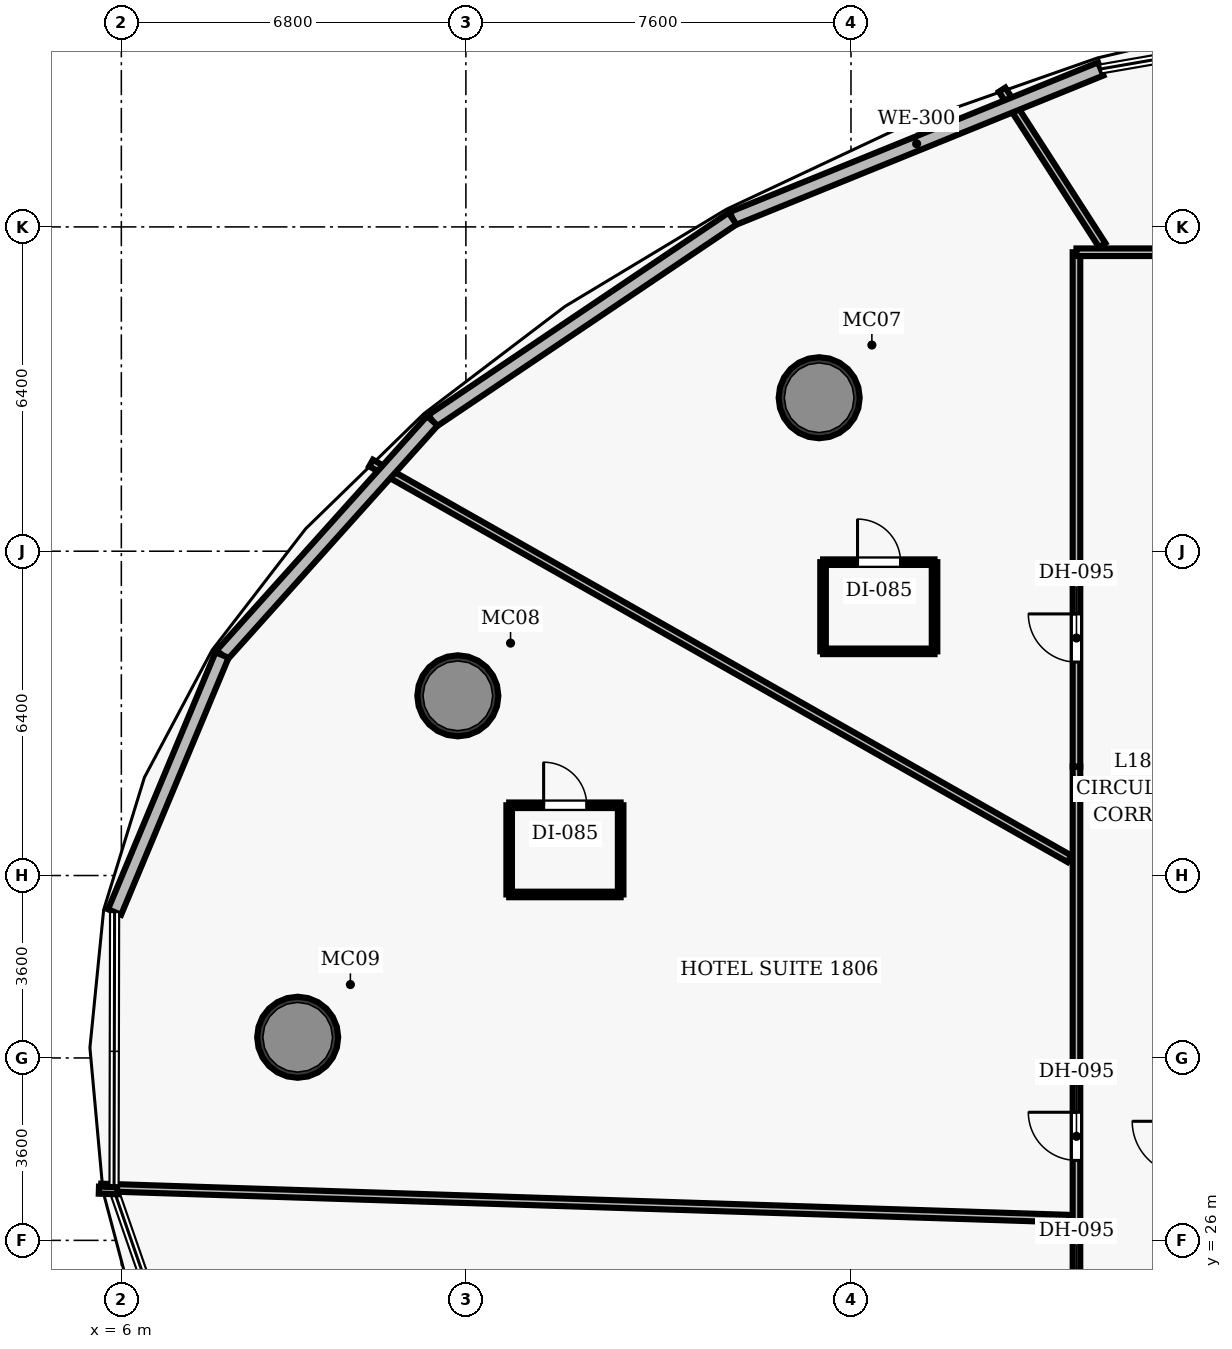
"""IFC4 building model, lengths in metres.
Left out: names, types, materials, properties, quantities, classifications, styles, units other than length and angle.
Written with IfcOpenShell. Run it as: python <this file> out.ifc"""

import sys

from ifc_helpers import new_model, si_unit, direction, frame, frame_2d, origin, origin_2d, place, context, subcontext, project, spatial, rectangle, hollow_circle, extrude, element, fill, save


model = new_model("IFC4")
c1 = context("Model", 3, precision=1e-05, world=origin(), true_north=direction((0.0, 1.0)))
c2 = subcontext(c1, "Body", "Model", "MODEL_VIEW")
j1 = project(units=[si_unit("LENGTHUNIT", "METRE"), si_unit("PLANEANGLEUNIT", "RADIAN")], contexts=[c1])
p1 = place(None, origin())
s1 = spatial("IfcSite", under=j1, at=p1, CompositionType="ELEMENT")
p2 = place(p1, origin())
s2 = spatial("IfcBuilding", under=s1, at=p2, CompositionType="ELEMENT")
p3 = place(p2, frame((0.0, 0.0, 79.9)))
s3 = spatial("IfcBuildingStorey", under=s2, at=p3, CompositionType="ELEMENT", Elevation=79.9)
for number, where, z_axis, x_axis in (
    (1, (19.772, 42.629, 0.0), (0.0, 0.0, 1.0), (1.0, 0.0, 0.0)),
    (2, (12.641, 36.746, 0.0), (0.0, 0.0, 1.0), (1.0, 0.0, 0.0)),
    (3, (9.48, 30.008, 0.0), (0.0, 0.0, 1.0), (1.0, 0.0, 0.0)),
):
    element("IfcColumn", number, at=place(p3, frame(where, z_axis=z_axis, x_axis=x_axis)), inside=s3, PredefinedType="COLUMN", context=c2, shape_type="SweptSolid", body=[
        extrude(hollow_circle(Radius=0.8, WallThickness=0.06, at=origin_2d()), origin(), (0.0, 0.0, 1.0), 3.5),
    ])
p4 = place(p3, frame((24.85, 19.45, 0.0), z_axis=(0.0, 0.0, 1.0), x_axis=(0.0, 1.0, 0.0)))
e4 = element("IfcWall", 4, at=p4, inside=s3, PredefinedType="PARTITIONING", context=c2, shape_type="SweptSolid", body=[
    extrude(rectangle(XDim=15.9, YDim=0.15, at=frame_2d((7.95, 0.0))), origin(), (0.0, 0.0, 1.0), 2.6),
])
p5 = place(p4, frame((8.128, 0.0, 0.0)))
e5 = element("IfcOpeningElement", 5, at=p5, cuts=e4, PredefinedType="OPENING", context=c2, shape_type="SweptSolid", body=[
    extrude(rectangle(XDim=0.95, YDim=2.15, at=frame_2d((0.475, 1.075))), frame((0.0, 0.085, 0.0), z_axis=(0.0, -1.0, 0.0), x_axis=(1.0, 0.0, 0.0)), (0.0, 0.0, 1.0), 0.17),
])
p6 = place(p4, frame((4.98, 0.0, 0.0)))
e6 = element("IfcOpeningElement", 6, at=p6, cuts=e4, PredefinedType="OPENING", context=c2, shape_type="SweptSolid", body=[
    extrude(rectangle(XDim=0.95, YDim=2.15, at=frame_2d((0.475, 1.075))), frame((0.0, 0.085, 0.0), z_axis=(0.0, -1.0, 0.0), x_axis=(1.0, 0.0, 0.0)), (0.0, 0.0, 1.0), 0.17),
])
p7 = place(p3, frame((24.85, 35.35, 0.0), z_axis=(0.0, 0.0, 1.0), x_axis=(0.0, 1.0, 0.0)))
e7 = element("IfcWall", 7, at=p7, inside=s3, PredefinedType="PARTITIONING", context=c2, shape_type="SweptSolid", body=[
    extrude(rectangle(XDim=10.15, YDim=0.15, at=frame_2d((5.075, 0.0))), origin(), (0.0, 0.0, 1.0), 2.6),
])
p8 = place(p7, frame((2.062, 0.0, 0.0)))
e8 = element("IfcOpeningElement", 8, at=p8, cuts=e7, PredefinedType="OPENING", context=c2, shape_type="SweptSolid", body=[
    extrude(rectangle(XDim=0.95, YDim=2.15, at=frame_2d((0.475, 1.075))), frame((0.0, 0.085, 0.0), z_axis=(0.0, -1.0, 0.0), x_axis=(1.0, 0.0, 0.0)), (0.0, 0.0, 1.0), 0.17),
])
p9 = place(p3, frame((24.85, 45.5, 0.0), z_axis=(0.0, 0.0, 1.0), x_axis=(1.0, 0.0, 0.0)))
e9 = element("IfcWall", 9, at=p9, inside=s3, PredefinedType="PARTITIONING", context=c2, shape_type="SweptSolid", body=[
    extrude(rectangle(XDim=2.8, YDim=0.15, at=frame_2d((1.4, 0.0))), origin(), (0.0, 0.0, 1.0), 2.6),
])
p10 = place(p3, frame((25.358, 45.64, 0.0), z_axis=(0.0, 0.0, 1.0), x_axis=(-0.541288402423, 0.840837002874, 0.0)))
e10 = element("IfcWall", 10, at=p10, inside=s3, PredefinedType="PARTITIONING", context=c2, shape_type="SweptSolid", body=[
    extrude(rectangle(XDim=3.649, YDim=0.15, at=frame_2d((1.824, 0.0))), origin(), (0.0, 0.0, 1.0), 2.6),
])
p11 = place(p3, frame((24.71, 33.531, 0.0), z_axis=(0.0, 0.0, 1.0), x_axis=(-0.87002725421, 0.493003627707, 0.0)))
e11 = element("IfcWall", 11, at=p11, inside=s3, PredefinedType="PARTITIONING", context=c2, shape_type="SweptSolid", body=[
    extrude(rectangle(XDim=15.84, YDim=0.15, at=frame_2d((7.92, 0.0))), origin(), (0.0, 0.0, 1.0), 2.6),
])
p12 = place(p3, frame((24.71, 26.428, 0.0), z_axis=(0.0, 0.0, 1.0), x_axis=(-0.99948130829, 0.032204260266, 0.0)))
e12 = element("IfcWall", 12, at=p12, inside=s3, PredefinedType="PARTITIONING", context=c2, shape_type="SweptSolid", body=[
    extrude(rectangle(XDim=19.119, YDim=0.15, at=frame_2d((9.56, 0.0))), origin(), (0.0, 0.0, 1.0), 2.6),
])
p13 = place(p3, frame((19.849, 37.624, 0.0), z_axis=(0.0, 0.0, 1.0), x_axis=(1.0, 0.0, 0.0)))
e13 = element("IfcWall", 13, at=p13, inside=s3, PredefinedType="PARTITIONING", context=c2, shape_type="SweptSolid", body=[
    extrude(rectangle(XDim=2.2, YDim=0.11, at=frame_2d((1.1, 0.0))), origin(), (0.0, 0.0, 1.0), 2.6),
])
p14 = place(p3, frame((19.849, 39.384, 0.0), z_axis=(0.0, 0.0, 1.0), x_axis=(1.0, 0.0, 0.0)))
e14 = element("IfcWall", 14, at=p14, inside=s3, PredefinedType="PARTITIONING", context=c2, shape_type="SweptSolid", body=[
    extrude(rectangle(XDim=2.2, YDim=0.11, at=frame_2d((1.1, 0.0))), origin(), (0.0, 0.0, 1.0), 2.6),
])
p15 = place(p14, frame((0.68, 0.0, 0.0)))
e15 = element("IfcOpeningElement", 15, at=p15, cuts=e14, PredefinedType="OPENING", context=c2, shape_type="SweptSolid", body=[
    extrude(rectangle(XDim=0.85, YDim=2.1, at=frame_2d((0.425, 1.05))), frame((0.0, 0.065, 0.0), z_axis=(0.0, -1.0, 0.0), x_axis=(1.0, 0.0, 0.0)), (0.0, 0.0, 1.0), 0.13),
])
for number, where, z_axis, x_axis in (
    (16, (19.849, 37.624, 0.0), (0.0, 0.0, 1.0), (0.0, 1.0, 0.0)),
    (17, (22.049, 37.624, 0.0), (0.0, 0.0, 1.0), (0.0, 1.0, 0.0)),
):
    element("IfcWall", number, at=place(p3, frame(where, z_axis=z_axis, x_axis=x_axis)), inside=s3, PredefinedType="PARTITIONING", context=c2, shape_type="SweptSolid", body=[
        extrude(rectangle(XDim=1.76, YDim=0.11, at=frame_2d((0.88, 0.0))), origin(), (0.0, 0.0, 1.0), 2.6),
    ])
p16 = place(p3, frame((13.654, 32.826, 0.0), z_axis=(0.0, 0.0, 1.0), x_axis=(1.0, 0.0, 0.0)))
e18 = element("IfcWall", 18, at=p16, inside=s3, PredefinedType="PARTITIONING", context=c2, shape_type="SweptSolid", body=[
    extrude(rectangle(XDim=2.2, YDim=0.11, at=frame_2d((1.1, 0.0))), origin(), (0.0, 0.0, 1.0), 2.6),
])
p17 = place(p3, frame((13.654, 34.586, 0.0), z_axis=(0.0, 0.0, 1.0), x_axis=(1.0, 0.0, 0.0)))
e19 = element("IfcWall", 19, at=p17, inside=s3, PredefinedType="PARTITIONING", context=c2, shape_type="SweptSolid", body=[
    extrude(rectangle(XDim=2.2, YDim=0.11, at=frame_2d((1.1, 0.0))), origin(), (0.0, 0.0, 1.0), 2.6),
])
p18 = place(p17, frame((0.68, 0.0, 0.0)))
e20 = element("IfcOpeningElement", 20, at=p18, cuts=e19, PredefinedType="OPENING", context=c2, shape_type="SweptSolid", body=[
    extrude(rectangle(XDim=0.85, YDim=2.1, at=frame_2d((0.425, 1.05))), frame((0.0, 0.065, 0.0), z_axis=(0.0, -1.0, 0.0), x_axis=(1.0, 0.0, 0.0)), (0.0, 0.0, 1.0), 0.13),
])
for number, where, z_axis, x_axis in (
    (21, (13.654, 32.826, 0.0), (0.0, 0.0, 1.0), (0.0, 1.0, 0.0)),
    (22, (15.854, 32.826, 0.0), (0.0, 0.0, 1.0), (0.0, 1.0, 0.0)),
):
    element("IfcWall", number, at=place(p3, frame(where, z_axis=z_axis, x_axis=x_axis)), inside=s3, PredefinedType="PARTITIONING", context=c2, shape_type="SweptSolid", body=[
        extrude(rectangle(XDim=1.76, YDim=0.11, at=frame_2d((0.88, 0.0))), origin(), (0.0, 0.0, 1.0), 2.6),
    ])
p19 = place(p3, frame((18.062, 46.164, 0.0), z_axis=(0.0, 0.0, 1.0), x_axis=(0.926415021548, 0.376503928067, 0.0)))
e23 = element("IfcWall", 23, at=p19, inside=s3, PredefinedType="SOLIDWALL", context=c2, shape_type="SweptSolid", body=[
    extrude(rectangle(XDim=7.845, YDim=0.28, at=frame_2d((3.922, 0.0))), origin(), (0.0, 0.0, 1.0), 3.25),
])
p20 = place(p3, frame((12.137, 42.173, 0.0), z_axis=(0.0, 0.0, 1.0), x_axis=(0.829395880277, 0.558661322967, 0.0)))
e24 = element("IfcWall", 24, at=p20, inside=s3, PredefinedType="SOLIDWALL", context=c2, shape_type="SweptSolid", body=[
    extrude(rectangle(XDim=7.143, YDim=0.28, at=frame_2d((3.571, 0.0))), origin(), (0.0, 0.0, 1.0), 3.25),
])
p21 = place(p3, frame((7.987, 37.551, 0.0), z_axis=(0.0, 0.0, 1.0), x_axis=(0.668121821361, 0.744051901295, 0.0)))
e25 = element("IfcWall", 25, at=p21, inside=s3, PredefinedType="SOLIDWALL", context=c2, shape_type="SweptSolid", body=[
    extrude(rectangle(XDim=6.212, YDim=0.28, at=frame_2d((3.106, 0.0))), origin(), (0.0, 0.0, 1.0), 3.25),
])
p22 = place(p3, frame((5.867, 32.479, 0.0), z_axis=(0.0, 0.0, 1.0), x_axis=(0.385703037269, 0.922622982069, 0.0)))
e26 = element("IfcWall", 26, at=p22, inside=s3, PredefinedType="SOLIDWALL", context=c2, shape_type="SweptSolid", body=[
    extrude(rectangle(XDim=5.497, YDim=0.28, at=frame_2d((2.749, 0.0))), origin(), (0.0, 0.0, 1.0), 3.25),
])
p23 = place(p8, origin())
e27 = element("IfcDoor", 27, at=p23, inside=s3, OperationType="SINGLE_SWING_RIGHT", PredefinedType="DOOR", context=c2, shape_type="SweptSolid", body=[
    extrude(rectangle(XDim=0.95, YDim=2.15, at=frame_2d((0.475, 1.075))), frame((0.0, 0.025, 0.0), z_axis=(0.0, -1.0, 0.0), x_axis=(1.0, 0.0, 0.0)), (0.0, 0.0, 1.0), 0.05),
])
fill(e8, e27)
p24 = place(p15, origin())
e28 = element("IfcDoor", 28, at=p24, inside=s3, OperationType="SINGLE_SWING_LEFT", PredefinedType="DOOR", context=c2, shape_type="SweptSolid", body=[
    extrude(rectangle(XDim=0.85, YDim=2.1, at=frame_2d((0.425, 1.05))), frame((0.0, 0.025, 0.0), z_axis=(0.0, -1.0, 0.0), x_axis=(1.0, 0.0, 0.0)), (0.0, 0.0, 1.0), 0.05),
])
fill(e15, e28)
p25 = place(p5, origin())
e29 = element("IfcDoor", 29, at=p25, inside=s3, OperationType="SINGLE_SWING_RIGHT", PredefinedType="DOOR", context=c2, shape_type="SweptSolid", body=[
    extrude(rectangle(XDim=0.95, YDim=2.15, at=frame_2d((0.475, 1.075))), frame((0.0, 0.025, 0.0), z_axis=(0.0, -1.0, 0.0), x_axis=(1.0, 0.0, 0.0)), (0.0, 0.0, 1.0), 0.05),
])
fill(e5, e29)
p26 = place(p18, origin())
e30 = element("IfcDoor", 30, at=p26, inside=s3, OperationType="SINGLE_SWING_LEFT", PredefinedType="DOOR", context=c2, shape_type="SweptSolid", body=[
    extrude(rectangle(XDim=0.85, YDim=2.1, at=frame_2d((0.425, 1.05))), frame((0.0, 0.025, 0.0), z_axis=(0.0, -1.0, 0.0), x_axis=(1.0, 0.0, 0.0)), (0.0, 0.0, 1.0), 0.05),
])
fill(e20, e30)
save(model, sys.argv[1])
